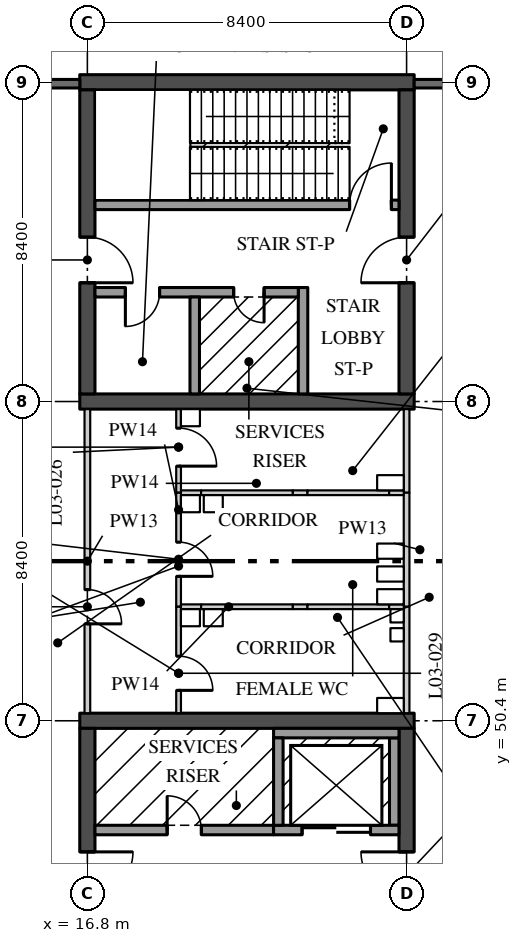
"""IFC4 building model, lengths in metres.
Left out: names, types, materials, properties, quantities, classifications, styles, units other than length and angle.
Written with IfcOpenShell. Run it as: python <this file> out.ifc"""

import sys

from ifc_helpers import new_model, si_unit, direction, frame, frame_2d, origin, place, context, subcontext, project, spatial, rectangle, extrude, element, fill, save


model = new_model("IFC4")
c1 = context("Model", 3, precision=1e-05, world=origin(), true_north=direction((0.0, 1.0)))
c2 = subcontext(c1, "Body", "Model", "MODEL_VIEW")
j1 = project(units=[si_unit("LENGTHUNIT", "METRE"), si_unit("PLANEANGLEUNIT", "RADIAN")], contexts=[c1])
p1 = place(None, origin())
s1 = spatial("IfcSite", under=j1, at=p1, CompositionType="ELEMENT")
p2 = place(p1, origin())
s2 = spatial("IfcBuilding", under=s1, at=p2, CompositionType="ELEMENT")
p3 = place(p2, frame((0.0, 0.0, 14.4)))
s3 = spatial("IfcBuildingStorey", under=s2, at=p3, CompositionType="ELEMENT", Elevation=14.4)
p4 = place(p3, frame((16.6, 50.4, 0.0), z_axis=(0.0, 0.0, 1.0), x_axis=(1.0, 0.0, 0.0)))
e1 = element("IfcWall", 1, at=p4, inside=s3, PredefinedType="SHEAR", context=c2, shape_type="SweptSolid", body=[
    extrude(rectangle(XDim=8.8, YDim=0.4, at=frame_2d((4.4, 0.0))), origin(), (0.0, 0.0, 1.0), 4.37),
])
p5 = place(p3, frame((16.8, 42.2, 0.0), z_axis=(0.0, 0.0, 1.0), x_axis=(0.0, 1.0, 0.0)))
e2 = element("IfcWall", 2, at=p5, inside=s3, PredefinedType="SHEAR", context=c2, shape_type="SweptSolid", body=[
    extrude(rectangle(XDim=8.0, YDim=0.4, at=frame_2d((4.0, 0.0))), origin(), (0.0, 0.0, 1.0), 4.37),
])
p6 = place(p5, frame((3.55, 0.0, 0.0)))
e3 = element("IfcOpeningElement", 3, at=p6, cuts=e2, PredefinedType="OPENING", context=c2, shape_type="SweptSolid", body=[
    extrude(rectangle(XDim=1.2, YDim=2.1, at=frame_2d((0.6, 1.05))), frame((0.0, 0.21, 0.0), z_axis=(0.0, -1.0, 0.0), x_axis=(1.0, 0.0, 0.0)), (0.0, 0.0, 1.0), 0.42),
])
p7 = place(p5, frame((0.8, 0.0, 0.0)))
e4 = element("IfcOpeningElement", 4, at=p7, cuts=e2, PredefinedType="OPENING", context=c2, shape_type="SweptSolid", body=[
    extrude(rectangle(XDim=1.2, YDim=2.1, at=frame_2d((0.6, 1.05))), frame((0.0, 0.21, 0.0), z_axis=(0.0, -1.0, 0.0), x_axis=(1.0, 0.0, 0.0)), (0.0, 0.0, 1.0), 0.42),
])
p8 = place(p3, frame((25.2, 42.2, 0.0), z_axis=(0.0, 0.0, 1.0), x_axis=(0.0, 1.0, 0.0)))
e5 = element("IfcWall", 5, at=p8, inside=s3, PredefinedType="SHEAR", context=c2, shape_type="SweptSolid", body=[
    extrude(rectangle(XDim=8.0, YDim=0.4, at=frame_2d((4.0, 0.0))), origin(), (0.0, 0.0, 1.0), 4.37),
])
p9 = place(p8, frame((3.55, 0.0, 0.0)))
e6 = element("IfcOpeningElement", 6, at=p9, cuts=e5, PredefinedType="OPENING", context=c2, shape_type="SweptSolid", body=[
    extrude(rectangle(XDim=1.2, YDim=2.1, at=frame_2d((0.6, 1.05))), frame((0.0, 0.21, 0.0), z_axis=(0.0, -1.0, 0.0), x_axis=(1.0, 0.0, 0.0)), (0.0, 0.0, 1.0), 0.42),
])
p10 = place(p3, frame((21.7, 47.525, 0.0), z_axis=(0.0, 0.0, 1.0), x_axis=(-1.0, 0.0, 0.0)))
e7 = element("IfcWall", 7, at=p10, inside=s3, PredefinedType="SOLIDWALL", context=c2, shape_type="SweptSolid", body=[
    extrude(rectangle(XDim=4.7, YDim=0.25, at=frame_2d((2.35, 0.0))), origin(), (0.0, 0.0, 1.0), 4.37),
])
p11 = place(p10, frame((1.9, 0.0, 0.0)))
e8 = element("IfcOpeningElement", 8, at=p11, cuts=e7, PredefinedType="OPENING", context=c2, shape_type="SweptSolid", body=[
    extrude(rectangle(XDim=0.9, YDim=2.1, at=frame_2d((0.45, 1.05))), frame((0.0, 0.135, 0.0), z_axis=(0.0, -1.0, 0.0), x_axis=(1.0, 0.0, 0.0)), (0.0, 0.0, 1.0), 0.27),
])
for number, where, z_axis, x_axis in (
    (9, (16.6, 58.8, 0.0), (0.0, 0.0, 1.0), (1.0, 0.0, 0.0)),
    (10, (16.6, 67.2, 0.0), (0.0, 0.0, 1.0), (1.0, 0.0, 0.0)),
):
    element("IfcWall", number, at=place(p3, frame(where, z_axis=z_axis, x_axis=x_axis)), inside=s3, PredefinedType="SHEAR", context=c2, shape_type="SweptSolid", body=[
        extrude(rectangle(XDim=8.8, YDim=0.4, at=frame_2d((4.4, 0.0))), origin(), (0.0, 0.0, 1.0), 4.37),
    ])
p12 = place(p3, frame((16.8, 59.0, 0.0), z_axis=(0.0, 0.0, 1.0), x_axis=(0.0, 1.0, 0.0)))
e11 = element("IfcWall", 11, at=p12, inside=s3, PredefinedType="SHEAR", context=c2, shape_type="SweptSolid", body=[
    extrude(rectangle(XDim=8.0, YDim=0.4, at=frame_2d((4.0, 0.0))), origin(), (0.0, 0.0, 1.0), 4.37),
])
p13 = place(p12, frame((2.925, 0.0, 0.0)))
e12 = element("IfcOpeningElement", 12, at=p13, cuts=e11, PredefinedType="OPENING", context=c2, shape_type="SweptSolid", body=[
    extrude(rectangle(XDim=1.2, YDim=2.1, at=frame_2d((0.6, 1.05))), frame((0.0, 0.21, 0.0), z_axis=(0.0, -1.0, 0.0), x_axis=(1.0, 0.0, 0.0)), (0.0, 0.0, 1.0), 0.42),
])
p14 = place(p3, frame((25.2, 59.0, 0.0), z_axis=(0.0, 0.0, 1.0), x_axis=(0.0, 1.0, 0.0)))
e13 = element("IfcWall", 13, at=p14, inside=s3, PredefinedType="SHEAR", context=c2, shape_type="SweptSolid", body=[
    extrude(rectangle(XDim=8.0, YDim=0.4, at=frame_2d((4.0, 0.0))), origin(), (0.0, 0.0, 1.0), 4.37),
])
p15 = place(p14, frame((2.925, 0.0, 0.0)))
e14 = element("IfcOpeningElement", 14, at=p15, cuts=e13, PredefinedType="OPENING", context=c2, shape_type="SweptSolid", body=[
    extrude(rectangle(XDim=1.2, YDim=2.1, at=frame_2d((0.6, 1.05))), frame((0.0, 0.21, 0.0), z_axis=(0.0, -1.0, 0.0), x_axis=(1.0, 0.0, 0.0)), (0.0, 0.0, 1.0), 0.42),
])
p16 = place(p3, frame((25.0, 63.975, 0.0), z_axis=(0.0, 0.0, 1.0), x_axis=(-1.0, 0.0, 0.0)))
e15 = element("IfcWall", 15, at=p16, inside=s3, PredefinedType="SOLIDWALL", context=c2, shape_type="SweptSolid", body=[
    extrude(rectangle(XDim=8.0, YDim=0.25, at=frame_2d((4.0, 0.0))), origin(), (0.0, 0.0, 1.0), 4.37),
])
p17 = place(p16, frame((0.2, 0.0, 0.0)))
e16 = element("IfcOpeningElement", 16, at=p17, cuts=e15, PredefinedType="OPENING", context=c2, shape_type="SweptSolid", body=[
    extrude(rectangle(XDim=1.1, YDim=2.1, at=frame_2d((0.55, 1.05))), frame((0.0, 0.135, 0.0), z_axis=(0.0, -1.0, 0.0), x_axis=(1.0, 0.0, 0.0)), (0.0, 0.0, 1.0), 0.27),
])
p18 = place(p3, frame((22.475, 61.8, 0.0), z_axis=(0.0, 0.0, 1.0), x_axis=(0.0, -1.0, 0.0)))
e17 = element("IfcWall", 17, at=p18, inside=s3, PredefinedType="SOLIDWALL", context=c2, shape_type="SweptSolid", body=[
    extrude(rectangle(XDim=2.8, YDim=0.25, at=frame_2d((1.4, 0.0))), origin(), (0.0, 0.0, 1.0), 4.37),
])
p19 = place(p3, frame((22.35, 61.675, 0.0), z_axis=(0.0, 0.0, 1.0), x_axis=(-1.0, 0.0, 0.0)))
e18 = element("IfcWall", 18, at=p19, inside=s3, PredefinedType="SOLIDWALL", context=c2, shape_type="SweptSolid", body=[
    extrude(rectangle(XDim=5.35, YDim=0.25, at=frame_2d((2.675, 0.0))), origin(), (0.0, 0.0, 1.0), 4.37),
])
p20 = place(p19, frame((3.65, 0.0, 0.0)))
e19 = element("IfcOpeningElement", 19, at=p20, cuts=e18, PredefinedType="OPENING", context=c2, shape_type="SweptSolid", body=[
    extrude(rectangle(XDim=0.9, YDim=2.1, at=frame_2d((0.45, 1.05))), frame((0.0, 0.135, 0.0), z_axis=(0.0, -1.0, 0.0), x_axis=(1.0, 0.0, 0.0)), (0.0, 0.0, 1.0), 0.27),
])
p21 = place(p19, frame((0.9, 0.0, 0.0)))
e20 = element("IfcOpeningElement", 20, at=p21, cuts=e18, PredefinedType="OPENING", context=c2, shape_type="SweptSolid", body=[
    extrude(rectangle(XDim=0.8, YDim=2.1, at=frame_2d((0.4, 1.05))), frame((0.0, 0.135, 0.0), z_axis=(0.0, -1.0, 0.0), x_axis=(1.0, 0.0, 0.0)), (0.0, 0.0, 1.0), 0.27),
])
p22 = place(p3, frame((19.625, 61.55, 0.0), z_axis=(0.0, 0.0, 1.0), x_axis=(0.0, -1.0, 0.0)))
e21 = element("IfcWall", 21, at=p22, inside=s3, PredefinedType="SOLIDWALL", context=c2, shape_type="SweptSolid", body=[
    extrude(rectangle(XDim=2.55, YDim=0.25, at=frame_2d((1.275, 0.0))), origin(), (0.0, 0.0, 1.0), 4.37),
])
p23 = place(p3, frame((24.875, 47.65, 0.0), z_axis=(0.0, 0.0, 1.0), x_axis=(0.0, 1.0, 0.0)))
e22 = element("IfcWall", 22, at=p23, inside=s3, PredefinedType="SOLIDWALL", context=c2, shape_type="SweptSolid", body=[
    extrude(rectangle(XDim=2.3, YDim=0.25, at=frame_2d((1.15, 0.0))), origin(), (0.0, 0.0, 1.0), 4.37),
])
p24 = place(p3, frame((21.7, 50.075, 0.0), z_axis=(0.0, 0.0, 1.0), x_axis=(1.0, 0.0, 0.0)))
e23 = element("IfcWall", 23, at=p24, inside=s3, PredefinedType="SOLIDWALL", context=c2, shape_type="SweptSolid", body=[
    extrude(rectangle(XDim=3.3, YDim=0.25, at=frame_2d((1.65, 0.0))), origin(), (0.0, 0.0, 1.0), 4.37),
])
p25 = place(p3, frame((21.7, 47.525, 0.0), z_axis=(0.0, 0.0, 1.0), x_axis=(1.0, 0.0, 0.0)))
e24 = element("IfcWall", 24, at=p25, inside=s3, PredefinedType="SOLIDWALL", context=c2, shape_type="SweptSolid", body=[
    extrude(rectangle(XDim=3.3, YDim=0.25, at=frame_2d((1.65, 0.0))), origin(), (0.0, 0.0, 1.0), 4.37),
])
p26 = place(p25, frame((0.75, 0.0, 0.0)))
e25 = element("IfcOpeningElement", 25, at=p26, cuts=e24, PredefinedType="OPENING", context=c2, shape_type="SweptSolid", body=[
    extrude(rectangle(XDim=1.8, YDim=2.1, at=frame_2d((0.9, 1.05))), frame((0.0, 0.135, 0.0), z_axis=(0.0, -1.0, 0.0), x_axis=(1.0, 0.0, 0.0)), (0.0, 0.0, 1.0), 0.27),
])
p27 = place(p3, frame((21.825, 47.65, 0.0), z_axis=(0.0, 0.0, 1.0), x_axis=(0.0, 1.0, 0.0)))
e26 = element("IfcWall", 26, at=p27, inside=s3, PredefinedType="SOLIDWALL", context=c2, shape_type="SweptSolid", body=[
    extrude(rectangle(XDim=2.3, YDim=0.25, at=frame_2d((1.15, 0.0))), origin(), (0.0, 0.0, 1.0), 4.37),
])
p28 = place(p3, frame((25.2, 56.4, 0.0), z_axis=(0.0, 0.0, 1.0), x_axis=(0.0, 1.0, 0.0)))
e27 = element("IfcWall", 27, at=p28, inside=s3, PredefinedType="PARTITIONING", context=c2, shape_type="SweptSolid", body=[
    extrude(rectangle(XDim=2.2, YDim=0.15, at=frame_2d((1.1, 0.0))), origin(), (0.0, 0.0, 1.0), 3.746),
])
p29 = place(p3, frame((25.2, 53.4, 0.0), z_axis=(0.0, 0.0, 1.0), x_axis=(0.0, 1.0, 0.0)))
e28 = element("IfcWall", 28, at=p29, inside=s3, PredefinedType="PARTITIONING", context=c2, shape_type="SweptSolid", body=[
    extrude(rectangle(XDim=3.0, YDim=0.15, at=frame_2d((1.5, 0.0))), origin(), (0.0, 0.0, 1.0), 3.746),
])
p30 = place(p3, frame((25.2, 50.6, 0.0), z_axis=(0.0, 0.0, 1.0), x_axis=(0.0, 1.0, 0.0)))
e29 = element("IfcWall", 29, at=p30, inside=s3, PredefinedType="PARTITIONING", context=c2, shape_type="SweptSolid", body=[
    extrude(rectangle(XDim=2.8, YDim=0.15, at=frame_2d((1.4, 0.0))), origin(), (0.0, 0.0, 1.0), 3.746),
])
p31 = place(p3, frame((16.8, 50.6, 0.0), z_axis=(0.0, 0.0, 1.0), x_axis=(0.0, 1.0, 0.0)))
e30 = element("IfcWall", 30, at=p31, inside=s3, PredefinedType="PARTITIONING", context=c2, shape_type="SweptSolid", body=[
    extrude(rectangle(XDim=8.0, YDim=0.15, at=frame_2d((4.0, 0.0))), origin(), (0.0, 0.0, 1.0), 3.746),
])
p32 = place(p31, frame((2.35, 0.0, 0.0)))
e31 = element("IfcOpeningElement", 31, at=p32, cuts=e30, PredefinedType="OPENING", context=c2, shape_type="SweptSolid", body=[
    extrude(rectangle(XDim=0.9, YDim=2.1, at=frame_2d((0.45, 1.05))), frame((0.0, 0.085, 0.0), z_axis=(0.0, -1.0, 0.0), x_axis=(1.0, 0.0, 0.0)), (0.0, 0.0, 1.0), 0.17),
])
p33 = place(p3, frame((19.262, 56.4, 0.0), z_axis=(0.0, 0.0, 1.0), x_axis=(1.0, 0.0, 0.0)))
e32 = element("IfcWall", 32, at=p33, inside=s3, PredefinedType="PARTITIONING", context=c2, shape_type="SweptSolid", body=[
    extrude(rectangle(XDim=0.531, YDim=0.125, at=frame_2d((0.266, 0.0))), origin(), (0.0, 0.0, 1.0), 3.895),
])
p34 = place(p3, frame((19.793, 56.4, 0.0), z_axis=(0.0, 0.0, 1.0), x_axis=(1.0, 0.0, 0.0)))
e33 = element("IfcWall", 33, at=p34, inside=s3, PredefinedType="PARTITIONING", context=c2, shape_type="SweptSolid", body=[
    extrude(rectangle(XDim=2.414, YDim=0.125, at=frame_2d((1.207, 0.0))), origin(), (0.0, 0.0, 1.0), 4.37),
])
p35 = place(p3, frame((22.207, 56.4, 0.0), z_axis=(0.0, 0.0, 1.0), x_axis=(1.0, 0.0, 0.0)))
e34 = element("IfcWall", 34, at=p35, inside=s3, PredefinedType="PARTITIONING", context=c2, shape_type="SweptSolid", body=[
    extrude(rectangle(XDim=0.385, YDim=0.125, at=frame_2d((0.192, 0.0))), origin(), (0.0, 0.0, 1.0), 3.895),
])
p36 = place(p3, frame((22.592, 56.4, 0.0), z_axis=(0.0, 0.0, 1.0), x_axis=(1.0, 0.0, 0.0)))
e35 = element("IfcWall", 35, at=p36, inside=s3, PredefinedType="PARTITIONING", context=c2, shape_type="SweptSolid", body=[
    extrude(rectangle(XDim=2.148, YDim=0.125, at=frame_2d((1.074, 0.0))), origin(), (0.0, 0.0, 1.0), 4.37),
])
p37 = place(p3, frame((24.74, 56.4, 0.0), z_axis=(0.0, 0.0, 1.0), x_axis=(1.0, 0.0, 0.0)))
e36 = element("IfcWall", 36, at=p37, inside=s3, PredefinedType="PARTITIONING", context=c2, shape_type="SweptSolid", body=[
    extrude(rectangle(XDim=0.385, YDim=0.125, at=frame_2d((0.192, 0.0))), origin(), (0.0, 0.0, 1.0), 3.746),
])
p38 = place(p3, frame((19.2, 56.4, 0.0), z_axis=(0.0, 0.0, 1.0), x_axis=(0.0, 1.0, 0.0)))
e37 = element("IfcWall", 37, at=p38, inside=s3, PredefinedType="PARTITIONING", context=c2, shape_type="SweptSolid", body=[
    extrude(rectangle(XDim=2.2, YDim=0.125, at=frame_2d((1.1, 0.0))), origin(), (0.0, 0.0, 1.0), 4.37),
])
p39 = place(p38, frame((0.7, 0.0, 0.0)))
e38 = element("IfcOpeningElement", 38, at=p39, cuts=e37, PredefinedType="OPENING", context=c2, shape_type="SweptSolid", body=[
    extrude(rectangle(XDim=1.0, YDim=2.1, at=frame_2d((0.5, 1.05))), frame((0.0, 0.073, 0.0), z_axis=(0.0, -1.0, 0.0), x_axis=(1.0, 0.0, 0.0)), (0.0, 0.0, 1.0), 0.145),
])
p40 = place(p3, frame((19.2, 53.4, 0.0), z_axis=(0.0, 0.0, 1.0), x_axis=(0.0, 1.0, 0.0)))
e39 = element("IfcWall", 39, at=p40, inside=s3, PredefinedType="PARTITIONING", context=c2, shape_type="SweptSolid", body=[
    extrude(rectangle(XDim=3.0, YDim=0.125, at=frame_2d((1.5, 0.0))), origin(), (0.0, 0.0, 1.0), 4.37),
])
p41 = place(p40, frame((0.8, 0.0, 0.0)))
e40 = element("IfcOpeningElement", 40, at=p41, cuts=e39, PredefinedType="OPENING", context=c2, shape_type="SweptSolid", body=[
    extrude(rectangle(XDim=0.9, YDim=2.1, at=frame_2d((0.45, 1.05))), frame((0.0, 0.073, 0.0), z_axis=(0.0, -1.0, 0.0), x_axis=(1.0, 0.0, 0.0)), (0.0, 0.0, 1.0), 0.145),
])
p42 = place(p3, frame((19.262, 53.4, 0.0), z_axis=(0.0, 0.0, 1.0), x_axis=(1.0, 0.0, 0.0)))
e41 = element("IfcWall", 41, at=p42, inside=s3, PredefinedType="PARTITIONING", context=c2, shape_type="SweptSolid", body=[
    extrude(rectangle(XDim=0.531, YDim=0.125, at=frame_2d((0.266, 0.0))), origin(), (0.0, 0.0, 1.0), 3.895),
])
p43 = place(p3, frame((19.793, 53.4, 0.0), z_axis=(0.0, 0.0, 1.0), x_axis=(1.0, 0.0, 0.0)))
e42 = element("IfcWall", 42, at=p43, inside=s3, PredefinedType="PARTITIONING", context=c2, shape_type="SweptSolid", body=[
    extrude(rectangle(XDim=2.414, YDim=0.125, at=frame_2d((1.207, 0.0))), origin(), (0.0, 0.0, 1.0), 4.37),
])
p44 = place(p3, frame((22.207, 53.4, 0.0), z_axis=(0.0, 0.0, 1.0), x_axis=(1.0, 0.0, 0.0)))
e43 = element("IfcWall", 43, at=p44, inside=s3, PredefinedType="PARTITIONING", context=c2, shape_type="SweptSolid", body=[
    extrude(rectangle(XDim=0.385, YDim=0.125, at=frame_2d((0.192, 0.0))), origin(), (0.0, 0.0, 1.0), 3.895),
])
p45 = place(p3, frame((22.592, 53.4, 0.0), z_axis=(0.0, 0.0, 1.0), x_axis=(1.0, 0.0, 0.0)))
e44 = element("IfcWall", 44, at=p45, inside=s3, PredefinedType="PARTITIONING", context=c2, shape_type="SweptSolid", body=[
    extrude(rectangle(XDim=2.148, YDim=0.125, at=frame_2d((1.074, 0.0))), origin(), (0.0, 0.0, 1.0), 4.37),
])
p46 = place(p3, frame((24.74, 53.4, 0.0), z_axis=(0.0, 0.0, 1.0), x_axis=(1.0, 0.0, 0.0)))
e45 = element("IfcWall", 45, at=p46, inside=s3, PredefinedType="PARTITIONING", context=c2, shape_type="SweptSolid", body=[
    extrude(rectangle(XDim=0.385, YDim=0.125, at=frame_2d((0.192, 0.0))), origin(), (0.0, 0.0, 1.0), 3.746),
])
p47 = place(p3, frame((19.2, 50.6, 0.0), z_axis=(0.0, 0.0, 1.0), x_axis=(0.0, 1.0, 0.0)))
e46 = element("IfcWall", 46, at=p47, inside=s3, PredefinedType="PARTITIONING", context=c2, shape_type="SweptSolid", body=[
    extrude(rectangle(XDim=2.8, YDim=0.125, at=frame_2d((1.4, 0.0))), origin(), (0.0, 0.0, 1.0), 4.37),
])
p48 = place(p47, frame((0.6, 0.0, 0.0)))
e47 = element("IfcOpeningElement", 47, at=p48, cuts=e46, PredefinedType="OPENING", context=c2, shape_type="SweptSolid", body=[
    extrude(rectangle(XDim=0.9, YDim=2.1, at=frame_2d((0.45, 1.05))), frame((0.0, 0.073, 0.0), z_axis=(0.0, -1.0, 0.0), x_axis=(1.0, 0.0, 0.0)), (0.0, 0.0, 1.0), 0.145),
])
p49 = place(p3, frame((33.595, 67.163, 0.0), z_axis=(0.0, 0.0, 1.0), x_axis=(-1.0, 0.0, 0.0)))
e48 = element("IfcWall", 48, at=p49, inside=s3, PredefinedType="SOLIDWALL", context=c2, shape_type="SweptSolid", body=[
    extrude(rectangle(XDim=8.195, YDim=0.225, at=frame_2d((4.098, 0.0))), origin(), (0.0, 0.0, 1.0), 3.746),
])
p50 = place(p49, frame((0.895, 0.0, 1.5)))
e49 = element("IfcOpeningElement", 49, at=p50, cuts=e48, PredefinedType="OPENING", context=c2, shape_type="SweptSolid", body=[
    extrude(rectangle(XDim=2.4, YDim=0.9, at=frame_2d((1.2, 0.45))), frame((0.0, 0.123, 0.0), z_axis=(0.0, -1.0, 0.0), x_axis=(1.0, 0.0, 0.0)), (0.0, 0.0, 1.0), 0.245),
])
p51 = place(p3, frame((16.6, 67.163, 0.0), z_axis=(0.0, 0.0, 1.0), x_axis=(-1.0, 0.0, 0.0)))
e50 = element("IfcWall", 50, at=p51, inside=s3, PredefinedType="SOLIDWALL", context=c2, shape_type="SweptSolid", body=[
    extrude(rectangle(XDim=8.195, YDim=0.225, at=frame_2d((4.098, 0.0))), origin(), (0.0, 0.0, 1.0), 3.746),
])
p52 = place(p51, frame((5.2, 0.0, 1.5)))
e51 = element("IfcOpeningElement", 51, at=p52, cuts=e50, PredefinedType="OPENING", context=c2, shape_type="SweptSolid", body=[
    extrude(rectangle(XDim=1.8, YDim=0.6, at=frame_2d((0.9, 0.3))), frame((0.0, 0.123, 0.0), z_axis=(0.0, -1.0, 0.0), x_axis=(1.0, 0.0, 0.0)), (0.0, 0.0, 1.0), 0.245),
])
p53 = place(p6, frame((1.2, 0.0, 0.0), z_axis=(0.0, 0.0, 1.0), x_axis=(-1.0, 0.0, 0.0)))
e52 = element("IfcDoor", 52, at=p53, inside=s3, OperationType="SINGLE_SWING_RIGHT", PredefinedType="DOOR", context=c2, shape_type="SweptSolid", body=[
    extrude(rectangle(XDim=1.2, YDim=2.1, at=frame_2d((0.6, 1.05))), frame((0.0, 0.035, 0.0), z_axis=(0.0, -1.0, 0.0), x_axis=(1.0, 0.0, 0.0)), (0.0, 0.0, 1.0), 0.07),
])
fill(e3, e52)
p54 = place(p9, origin())
e53 = element("IfcDoor", 53, at=p54, inside=s3, OperationType="SINGLE_SWING_LEFT", PredefinedType="DOOR", context=c2, shape_type="SweptSolid", body=[
    extrude(rectangle(XDim=1.2, YDim=2.1, at=frame_2d((0.6, 1.05))), frame((0.0, 0.035, 0.0), z_axis=(0.0, -1.0, 0.0), x_axis=(1.0, 0.0, 0.0)), (0.0, 0.0, 1.0), 0.07),
])
fill(e6, e53)
p55 = place(p11, frame((0.9, 0.0, 0.0), z_axis=(0.0, 0.0, 1.0), x_axis=(-1.0, 0.0, 0.0)))
e54 = element("IfcDoor", 54, at=p55, inside=s3, OperationType="SINGLE_SWING_RIGHT", PredefinedType="DOOR", context=c2, shape_type="SweptSolid", body=[
    extrude(rectangle(XDim=0.9, YDim=2.1, at=frame_2d((0.45, 1.05))), frame((0.0, 0.035, 0.0), z_axis=(0.0, -1.0, 0.0), x_axis=(1.0, 0.0, 0.0)), (0.0, 0.0, 1.0), 0.07),
])
fill(e8, e54)
p56 = place(p20, origin())
e55 = element("IfcDoor", 55, at=p56, inside=s3, OperationType="SINGLE_SWING_LEFT", PredefinedType="DOOR", context=c2, shape_type="SweptSolid", body=[
    extrude(rectangle(XDim=0.9, YDim=2.1, at=frame_2d((0.45, 1.05))), frame((0.0, 0.035, 0.0), z_axis=(0.0, -1.0, 0.0), x_axis=(1.0, 0.0, 0.0)), (0.0, 0.0, 1.0), 0.07),
])
fill(e19, e55)
p57 = place(p13, frame((1.2, 0.0, 0.0), z_axis=(0.0, 0.0, 1.0), x_axis=(-1.0, 0.0, 0.0)))
e56 = element("IfcDoor", 56, at=p57, inside=s3, OperationType="SINGLE_SWING_LEFT", PredefinedType="DOOR", context=c2, shape_type="SweptSolid", body=[
    extrude(rectangle(XDim=1.2, YDim=2.1, at=frame_2d((0.6, 1.05))), frame((0.0, 0.035, 0.0), z_axis=(0.0, -1.0, 0.0), x_axis=(1.0, 0.0, 0.0)), (0.0, 0.0, 1.0), 0.07),
])
fill(e12, e56)
p58 = place(p15, origin())
e57 = element("IfcDoor", 57, at=p58, inside=s3, OperationType="SINGLE_SWING_RIGHT", PredefinedType="DOOR", context=c2, shape_type="SweptSolid", body=[
    extrude(rectangle(XDim=1.2, YDim=2.1, at=frame_2d((0.6, 1.05))), frame((0.0, 0.035, 0.0), z_axis=(0.0, -1.0, 0.0), x_axis=(1.0, 0.0, 0.0)), (0.0, 0.0, 1.0), 0.07),
])
fill(e14, e57)
p59 = place(p21, origin())
e58 = element("IfcDoor", 58, at=p59, inside=s3, OperationType="SINGLE_SWING_RIGHT", PredefinedType="DOOR", context=c2, shape_type="SweptSolid", body=[
    extrude(rectangle(XDim=0.8, YDim=2.1, at=frame_2d((0.4, 1.05))), frame((0.0, 0.035, 0.0), z_axis=(0.0, -1.0, 0.0), x_axis=(1.0, 0.0, 0.0)), (0.0, 0.0, 1.0), 0.07),
])
fill(e20, e58)
p60 = place(p17, frame((1.1, 0.0, 0.0), z_axis=(0.0, 0.0, 1.0), x_axis=(-1.0, 0.0, 0.0)))
e59 = element("IfcDoor", 59, at=p60, inside=s3, OperationType="SINGLE_SWING_LEFT", PredefinedType="DOOR", context=c2, shape_type="SweptSolid", body=[
    extrude(rectangle(XDim=1.1, YDim=2.1, at=frame_2d((0.55, 1.05))), frame((0.0, 0.035, 0.0), z_axis=(0.0, -1.0, 0.0), x_axis=(1.0, 0.0, 0.0)), (0.0, 0.0, 1.0), 0.07),
])
fill(e16, e59)
p61 = place(p26, origin())
e60 = element("IfcDoor", 60, at=p61, inside=s3, OperationType="DOUBLE_DOOR_SLIDING", PredefinedType="DOOR", context=c2, shape_type="SweptSolid", body=[
    extrude(rectangle(XDim=1.8, YDim=2.1, at=frame_2d((0.9, 1.05))), frame((0.0, 0.04, 0.0), z_axis=(0.0, -1.0, 0.0), x_axis=(1.0, 0.0, 0.0)), (0.0, 0.0, 1.0), 0.08),
])
fill(e25, e60)
p62 = place(p39, frame((1.0, 0.0, 0.0), z_axis=(0.0, 0.0, 1.0), x_axis=(-1.0, 0.0, 0.0)))
e61 = element("IfcDoor", 61, at=p62, inside=s3, OperationType="SINGLE_SWING_LEFT", PredefinedType="DOOR", context=c2, shape_type="SweptSolid", body=[
    extrude(rectangle(XDim=1.0, YDim=2.1, at=frame_2d((0.5, 1.05))), frame((0.0, 0.02, 0.0), z_axis=(0.0, -1.0, 0.0), x_axis=(1.0, 0.0, 0.0)), (0.0, 0.0, 1.0), 0.04),
])
fill(e38, e61)
p63 = place(p41, frame((0.9, 0.0, 0.0), z_axis=(0.0, 0.0, 1.0), x_axis=(-1.0, 0.0, 0.0)))
e62 = element("IfcDoor", 62, at=p63, inside=s3, OperationType="SINGLE_SWING_LEFT", PredefinedType="DOOR", context=c2, shape_type="SweptSolid", body=[
    extrude(rectangle(XDim=0.9, YDim=2.1, at=frame_2d((0.45, 1.05))), frame((0.0, 0.02, 0.0), z_axis=(0.0, -1.0, 0.0), x_axis=(1.0, 0.0, 0.0)), (0.0, 0.0, 1.0), 0.04),
])
fill(e40, e62)
p64 = place(p32, frame((0.9, 0.0, 0.0), z_axis=(0.0, 0.0, 1.0), x_axis=(-1.0, 0.0, 0.0)))
e63 = element("IfcDoor", 63, at=p64, inside=s3, OperationType="SINGLE_SWING_LEFT", PredefinedType="DOOR", context=c2, shape_type="SweptSolid", body=[
    extrude(rectangle(XDim=0.9, YDim=2.1, at=frame_2d((0.45, 1.05))), frame((0.0, 0.025, 0.0), z_axis=(0.0, -1.0, 0.0), x_axis=(1.0, 0.0, 0.0)), (0.0, 0.0, 1.0), 0.05),
])
fill(e31, e63)
p65 = place(p48, frame((0.9, 0.0, 0.0), z_axis=(0.0, 0.0, 1.0), x_axis=(-1.0, 0.0, 0.0)))
e64 = element("IfcDoor", 64, at=p65, inside=s3, OperationType="SINGLE_SWING_LEFT", PredefinedType="DOOR", context=c2, shape_type="SweptSolid", body=[
    extrude(rectangle(XDim=0.9, YDim=2.1, at=frame_2d((0.45, 1.05))), frame((0.0, 0.02, 0.0), z_axis=(0.0, -1.0, 0.0), x_axis=(1.0, 0.0, 0.0)), (0.0, 0.0, 1.0), 0.04),
])
fill(e47, e64)
save(model, sys.argv[1])
